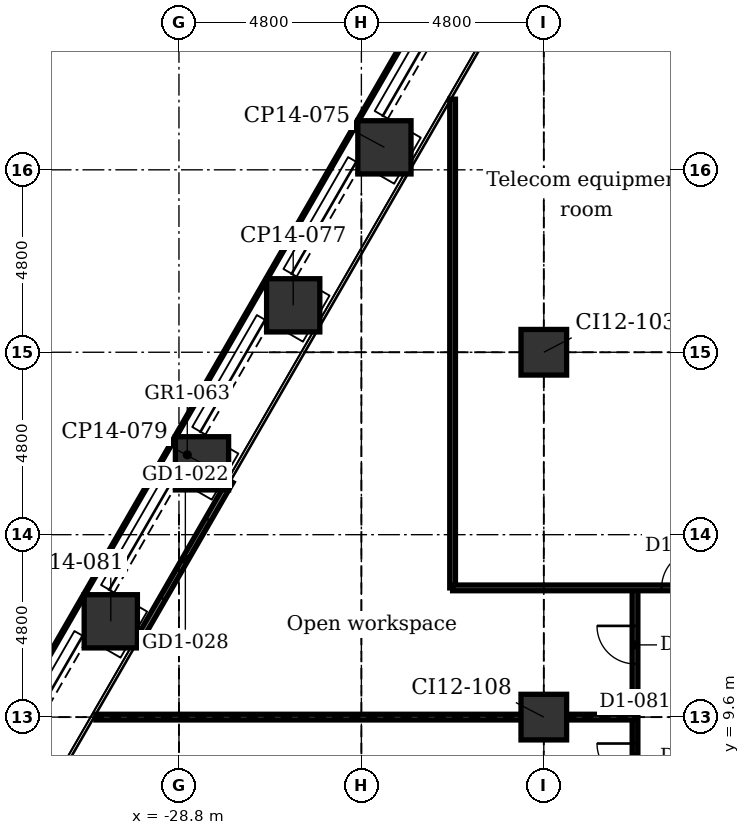
"""IFC4 building model, lengths in metres.
Left out: names, types, materials, properties, quantities, classifications, styles, units other than length and angle.
Written with IfcOpenShell. Run it as: python <this file> out.ifc"""

import sys

from ifc_helpers import new_model, si_unit, direction, frame, frame_2d, origin, origin_2d, place, context, subcontext, project, spatial, rectangle, extrude, element, fill, save


model = new_model("IFC4")
c1 = context("Model", 3, precision=1e-05, world=origin(), true_north=direction((0.0, 1.0)))
c2 = subcontext(c1, "Body", "Model", "MODEL_VIEW")
j1 = project(units=[si_unit("LENGTHUNIT", "METRE"), si_unit("PLANEANGLEUNIT", "RADIAN")], contexts=[c1])
p1 = place(None, origin())
s1 = spatial("IfcSite", under=j1, at=p1, CompositionType="ELEMENT")
p2 = place(p1, origin())
s2 = spatial("IfcBuilding", under=s1, at=p2, CompositionType="ELEMENT")
p3 = place(p2, frame((0.0, 0.0, 22.4)))
s3 = spatial("IfcBuildingStorey", under=s2, at=p3, CompositionType="ELEMENT", Elevation=22.4)
for number, where, z_axis, x_axis in (
    (1, (-32.994, 7.964, -0.25), (0.0, 0.0, 1.0), (0.5, 0.866, 0.0)),
    (2, (-30.594, 12.121, -0.25), (0.0, 0.0, 1.0), (0.5, 0.866, 0.0)),
    (3, (-28.194, 16.278, -0.25), (0.0, 0.0, 1.0), (0.5, 0.866, 0.0)),
    (4, (-25.794, 20.435, -0.25), (0.0, 0.0, 1.0), (0.5, 0.866, 0.0)),
    (5, (-23.394, 24.592, -0.25), (0.0, 0.0, 1.0), (0.5, 0.866, 0.0)),
):
    element("IfcColumn", number, at=place(p3, frame(where, z_axis=z_axis, x_axis=x_axis)), inside=s3, PredefinedType="COLUMN", context=c2, shape_type="SweptSolid", body=[
        extrude(rectangle(XDim=1.4, YDim=1.4, at=origin_2d()), origin(), (0.0, 0.0, 1.0), 5.5),
    ])
for number, where, z_axis, x_axis in (
    (6, (-19.2, 9.6, -0.25), (0.0, 0.0, 1.0), (1.0, 0.0, 0.0)),
    (7, (-19.2, 19.2, -0.25), (0.0, 0.0, 1.0), (1.0, 0.0, 0.0)),
):
    element("IfcColumn", number, at=place(p3, frame(where, z_axis=z_axis, x_axis=x_axis)), inside=s3, PredefinedType="COLUMN", context=c2, shape_type="SweptSolid", body=[
        extrude(rectangle(XDim=1.2, YDim=1.2, at=origin_2d()), origin(), (0.0, 0.0, 1.0), 5.5),
    ])
p4 = place(p3, frame((-29.817, 11.707, 0.0), z_axis=(0.0, 0.0, 1.0), x_axis=(0.499978080042, 0.866038058908, 0.0)))
e8 = element("IfcWall", 8, at=p4, inside=s3, PredefinedType="PARTITIONING", context=c2, shape_type="SweptSolid", body=[
    extrude(rectangle(XDim=4.74, YDim=0.16, at=frame_2d((2.37, 0.0))), origin(), (0.0, 0.0, 1.0), 5.25),
])
p5 = place(p4, frame((1.17, 0.0, 0.0)))
e9 = element("IfcOpeningElement", 9, at=p5, cuts=e8, PredefinedType="OPENING", context=c2, shape_type="SweptSolid", body=[
    extrude(rectangle(XDim=2.4, YDim=2.4, at=frame_2d((1.2, 1.2))), frame((0.0, 0.09, 0.0), z_axis=(0.0, -1.0, 0.0), x_axis=(1.0, 0.0, 0.0)), (0.0, 0.0, 1.0), 0.18),
])
p6 = place(p3, frame((-16.8, 3.95, 0.0), z_axis=(0.0, 0.0, 1.0), x_axis=(0.0, 1.0, 0.0)))
e10 = element("IfcWall", 10, at=p6, inside=s3, PredefinedType="PARTITIONING", context=c2, shape_type="SweptSolid", body=[
    extrude(rectangle(XDim=9.05, YDim=0.15, at=frame_2d((4.525, 0.0))), origin(), (0.0, 0.0, 1.0), 5.25),
])
p7 = place(p6, frame((0.95, 0.0, 0.0)))
e11 = element("IfcOpeningElement", 11, at=p7, cuts=e10, PredefinedType="OPENING", context=c2, shape_type="SweptSolid", body=[
    extrude(rectangle(XDim=1.0, YDim=2.1, at=frame_2d((0.5, 1.05))), frame((0.0, 0.085, 0.0), z_axis=(0.0, -1.0, 0.0), x_axis=(1.0, 0.0, 0.0)), (0.0, 0.0, 1.0), 0.17),
])
p8 = place(p6, frame((3.955, 0.0, 0.0)))
e12 = element("IfcOpeningElement", 12, at=p8, cuts=e10, PredefinedType="OPENING", context=c2, shape_type="SweptSolid", body=[
    extrude(rectangle(XDim=1.0, YDim=2.1, at=frame_2d((0.5, 1.05))), frame((0.0, 0.085, 0.0), z_axis=(0.0, -1.0, 0.0), x_axis=(1.0, 0.0, 0.0)), (0.0, 0.0, 1.0), 0.17),
])
p9 = place(p6, frame((7.05, 0.0, 0.0)))
e13 = element("IfcOpeningElement", 13, at=p9, cuts=e10, PredefinedType="OPENING", context=c2, shape_type="SweptSolid", body=[
    extrude(rectangle(XDim=1.0, YDim=2.1, at=frame_2d((0.5, 1.05))), frame((0.0, 0.085, 0.0), z_axis=(0.0, -1.0, 0.0), x_axis=(1.0, 0.0, 0.0)), (0.0, 0.0, 1.0), 0.17),
])
p10 = place(p3, frame((-21.6, 13.0, 0.0), z_axis=(0.0, 0.0, 1.0), x_axis=(0.0, 1.0, 0.0)))
e14 = element("IfcWall", 14, at=p10, inside=s3, PredefinedType="PARTITIONING", context=c2, shape_type="SweptSolid", body=[
    extrude(rectangle(XDim=12.858, YDim=0.15, at=frame_2d((6.429, 0.0))), origin(), (0.0, 0.0, 1.0), 5.25),
])
p11 = place(p3, frame((-30.987, 9.6, 0.0), z_axis=(0.0, 0.0, 1.0), x_axis=(1.0, 0.0, 0.0)))
e15 = element("IfcWall", 15, at=p11, inside=s3, PredefinedType="PARTITIONING", context=c2, shape_type="SweptSolid", body=[
    extrude(rectangle(XDim=11.187, YDim=0.15, at=frame_2d((5.593, 0.0))), origin(), (0.0, 0.0, 1.0), 4.488),
])
p12 = place(p3, frame((-18.6, 9.6, 0.0), z_axis=(0.0, 0.0, 1.0), x_axis=(1.0, 0.0, 0.0)))
e16 = element("IfcWall", 16, at=p12, inside=s3, PredefinedType="PARTITIONING", context=c2, shape_type="SweptSolid", body=[
    extrude(rectangle(XDim=1.8, YDim=0.15, at=frame_2d((0.9, 0.0))), origin(), (0.0, 0.0, 1.0), 4.642),
])
p13 = place(p3, frame((-21.6, 13.0, 0.0), z_axis=(0.0, 0.0, 1.0), x_axis=(1.0, 0.0, 0.0)))
e17 = element("IfcWall", 17, at=p13, inside=s3, PredefinedType="PARTITIONING", context=c2, shape_type="SweptSolid", body=[
    extrude(rectangle(XDim=38.4, YDim=0.15, at=frame_2d((19.2, 0.0))), origin(), (0.0, 0.0, 1.0), 5.25),
])
p14 = place(p13, frame((5.5, 0.0, 0.0)))
e18 = element("IfcOpeningElement", 18, at=p14, cuts=e17, PredefinedType="OPENING", context=c2, shape_type="SweptSolid", body=[
    extrude(rectangle(XDim=1.0, YDim=2.1, at=frame_2d((0.5, 1.05))), frame((0.0, 0.085, 0.0), z_axis=(0.0, -1.0, 0.0), x_axis=(1.0, 0.0, 0.0)), (0.0, 0.0, 1.0), 0.17),
])
p15 = place(p13, frame((9.825, 0.0, 0.0)))
e19 = element("IfcOpeningElement", 19, at=p15, cuts=e17, PredefinedType="OPENING", context=c2, shape_type="SweptSolid", body=[
    extrude(rectangle(XDim=1.0, YDim=2.1, at=frame_2d((0.5, 1.05))), frame((0.0, 0.085, 0.0), z_axis=(0.0, -1.0, 0.0), x_axis=(1.0, 0.0, 0.0)), (0.0, 0.0, 1.0), 0.17),
])
p16 = place(p13, frame((16.3, 0.0, 0.0)))
e20 = element("IfcOpeningElement", 20, at=p16, cuts=e17, PredefinedType="OPENING", context=c2, shape_type="SweptSolid", body=[
    extrude(rectangle(XDim=1.0, YDim=2.1, at=frame_2d((0.5, 1.05))), frame((0.0, 0.085, 0.0), z_axis=(0.0, -1.0, 0.0), x_axis=(1.0, 0.0, 0.0)), (0.0, 0.0, 1.0), 0.17),
])
p17 = place(p13, frame((22.155, 0.0, 0.0)))
e21 = element("IfcOpeningElement", 21, at=p17, cuts=e17, PredefinedType="OPENING", context=c2, shape_type="SweptSolid", body=[
    extrude(rectangle(XDim=1.8, YDim=2.1, at=frame_2d((0.9, 1.05))), frame((0.0, 0.085, 0.0), z_axis=(0.0, -1.0, 0.0), x_axis=(1.0, 0.0, 0.0)), (0.0, 0.0, 1.0), 0.17),
])
p18 = place(p13, frame((32.375, 0.0, 0.0)))
e22 = element("IfcOpeningElement", 22, at=p18, cuts=e17, PredefinedType="OPENING", context=c2, shape_type="SweptSolid", body=[
    extrude(rectangle(XDim=1.0, YDim=2.1, at=frame_2d((0.5, 1.05))), frame((0.0, 0.085, 0.0), z_axis=(0.0, -1.0, 0.0), x_axis=(1.0, 0.0, 0.0)), (0.0, 0.0, 1.0), 0.17),
])
p19 = place(p13, frame((36.625, 0.0, 0.0)))
e23 = element("IfcOpeningElement", 23, at=p19, cuts=e17, PredefinedType="OPENING", context=c2, shape_type="SweptSolid", body=[
    extrude(rectangle(XDim=1.0, YDim=2.1, at=frame_2d((0.5, 1.05))), frame((0.0, 0.085, 0.0), z_axis=(0.0, -1.0, 0.0), x_axis=(1.0, 0.0, 0.0)), (0.0, 0.0, 1.0), 0.17),
])
p20 = place(p13, frame((28.35, 0.0, 0.0)))
e24 = element("IfcOpeningElement", 24, at=p20, cuts=e17, PredefinedType="OPENING", context=c2, shape_type="SweptSolid", body=[
    extrude(rectangle(XDim=0.9, YDim=2.1, at=frame_2d((0.45, 1.05))), frame((0.0, 0.085, 0.0), z_axis=(0.0, -1.0, 0.0), x_axis=(1.0, 0.0, 0.0)), (0.0, 0.0, 1.0), 0.17),
])
p21 = place(p13, frame((25.35, 0.0, 0.0)))
e25 = element("IfcOpeningElement", 25, at=p21, cuts=e17, PredefinedType="OPENING", context=c2, shape_type="SweptSolid", body=[
    extrude(rectangle(XDim=0.9, YDim=2.1, at=frame_2d((0.45, 1.05))), frame((0.0, 0.085, 0.0), z_axis=(0.0, -1.0, 0.0), x_axis=(1.0, 0.0, 0.0)), (0.0, 0.0, 1.0), 0.17),
])
p22 = place(p5, origin())
e26 = element("IfcDoor", 26, at=p22, inside=s3, OperationType="DOUBLE_DOOR_SLIDING", PredefinedType="DOOR", context=c2, shape_type="SweptSolid", body=[
    extrude(rectangle(XDim=2.4, YDim=2.4, at=frame_2d((1.2, 1.2))), frame((0.0, 0.025, 0.0), z_axis=(0.0, -1.0, 0.0), x_axis=(1.0, 0.0, 0.0)), (0.0, 0.0, 1.0), 0.05),
])
fill(e9, e26)
p23 = place(p14, origin())
e27 = element("IfcDoor", 27, at=p23, inside=s3, OperationType="SINGLE_SWING_RIGHT", PredefinedType="DOOR", context=c2, shape_type="SweptSolid", body=[
    extrude(rectangle(XDim=1.0, YDim=2.1, at=frame_2d((0.5, 1.05))), frame((0.0, 0.025, 0.0), z_axis=(0.0, -1.0, 0.0), x_axis=(1.0, 0.0, 0.0)), (0.0, 0.0, 1.0), 0.05),
])
fill(e18, e27)
p24 = place(p8, origin())
e28 = element("IfcDoor", 28, at=p24, inside=s3, OperationType="SINGLE_SWING_RIGHT", PredefinedType="DOOR", context=c2, shape_type="SweptSolid", body=[
    extrude(rectangle(XDim=1.0, YDim=2.1, at=frame_2d((0.5, 1.05))), frame((0.0, 0.025, 0.0), z_axis=(0.0, -1.0, 0.0), x_axis=(1.0, 0.0, 0.0)), (0.0, 0.0, 1.0), 0.05),
])
fill(e12, e28)
p25 = place(p9, origin())
e29 = element("IfcDoor", 29, at=p25, inside=s3, OperationType="SINGLE_SWING_RIGHT", PredefinedType="DOOR", context=c2, shape_type="SweptSolid", body=[
    extrude(rectangle(XDim=1.0, YDim=2.1, at=frame_2d((0.5, 1.05))), frame((0.0, 0.025, 0.0), z_axis=(0.0, -1.0, 0.0), x_axis=(1.0, 0.0, 0.0)), (0.0, 0.0, 1.0), 0.05),
])
fill(e13, e29)
save(model, sys.argv[1])
